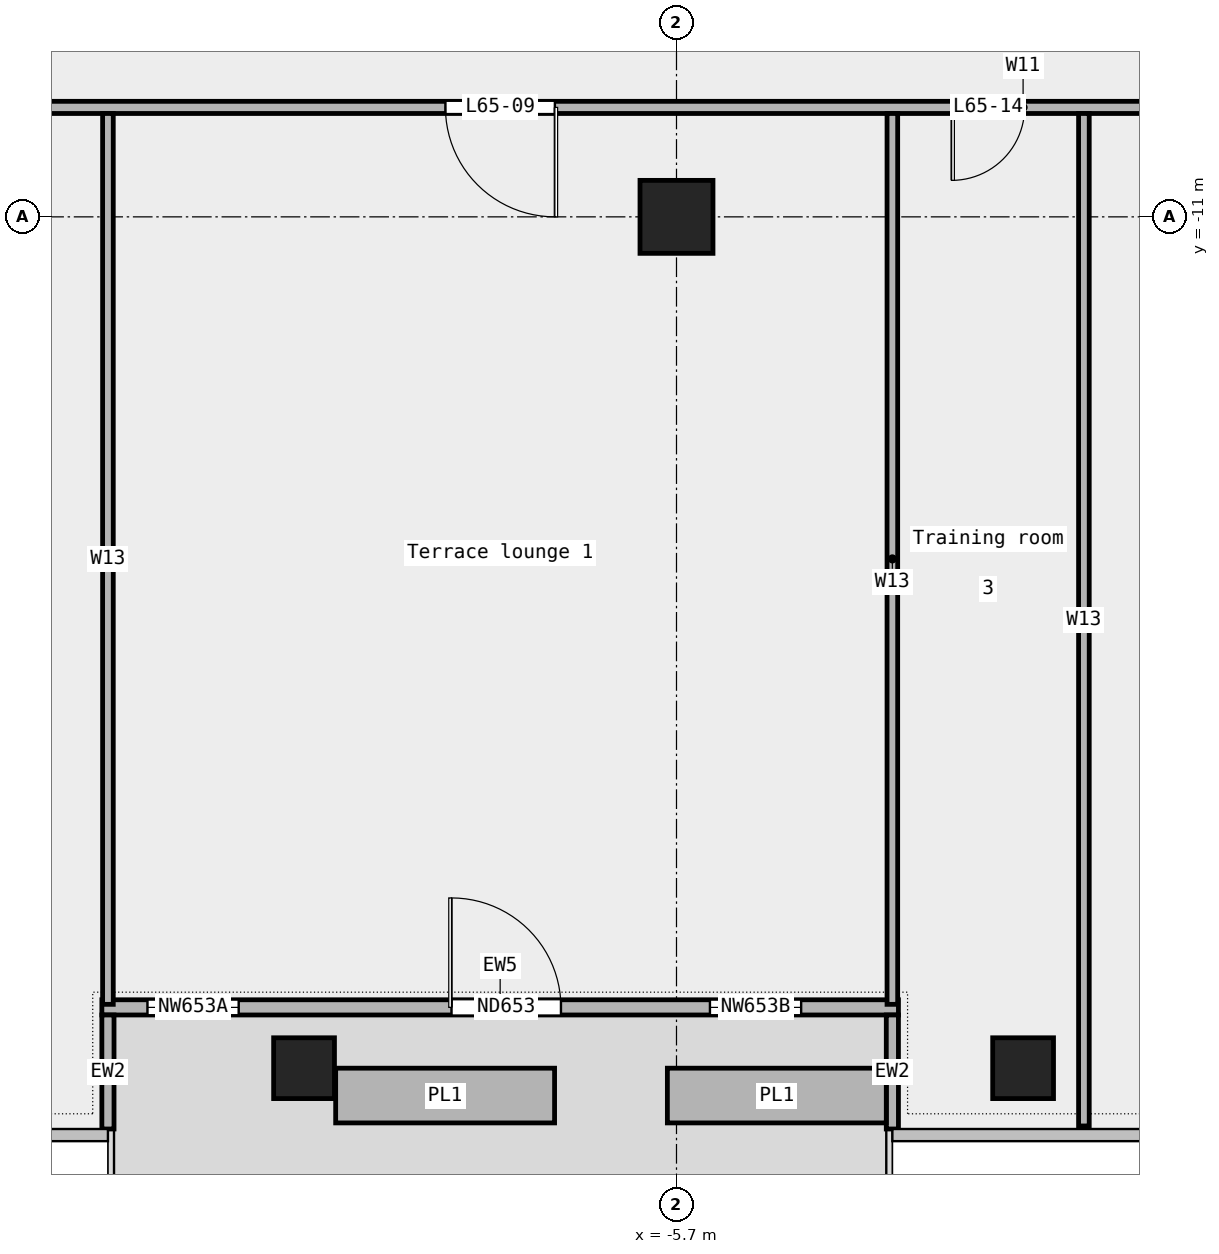
"""IFC4 building model, lengths in metres.
Left out: names, types, materials, properties, quantities, classifications, styles, units other than length and angle.
Written with IfcOpenShell. Run it as: python <this file> out.ifc"""

import sys

from ifc_helpers import new_model, si_unit, direction, frame, frame_2d, origin, origin_2d, place, context, subcontext, project, spatial, rectangle, extrude, element, fill, save


model = new_model("IFC4")
c1 = context("Model", 3, precision=1e-05, world=origin(), true_north=direction((0.0, 1.0)))
c2 = subcontext(c1, "Body", "Model", "MODEL_VIEW")
j1 = project(units=[si_unit("LENGTHUNIT", "METRE"), si_unit("PLANEANGLEUNIT", "RADIAN")], contexts=[c1])
p1 = place(None, origin())
s1 = spatial("IfcSite", under=j1, at=p1, CompositionType="ELEMENT")
p2 = place(p1, origin())
s2 = spatial("IfcBuilding", under=s1, at=p2, CompositionType="ELEMENT")
p3 = place(p2, frame((0.0, 0.0, 299.4)))
s3 = spatial("IfcBuildingStorey", under=s2, at=p3, CompositionType="ELEMENT", Elevation=299.4)
for number, where, z_axis, x_axis in (
    (1, (-11.825, -25.0, 0.0), (0.0, 0.0, 1.0), (1.0, 0.0, 0.0)),
    (2, (0.0, -25.0, 0.0), (0.0, 0.0, 1.0), (1.0, 0.0, 0.0)),
):
    element("IfcColumn", number, at=place(p3, frame(where, z_axis=z_axis, x_axis=x_axis)), inside=s3, PredefinedType="COLUMN", context=c2, shape_type="SweptSolid", body=[
        extrude(rectangle(XDim=1.0, YDim=1.0, at=origin_2d()), origin(), (0.0, 0.0, 1.0), 3.6),
    ])
p4 = place(p3, frame((-5.7, -11.0, 0.0), z_axis=(0.0, 0.0, 1.0), x_axis=(1.0, 0.0, 0.0)))
e3 = element("IfcColumn", 3, at=p4, inside=s3, PredefinedType="COLUMN", context=c2, shape_type="SweptSolid", body=[
    extrude(rectangle(XDim=1.2, YDim=1.2, at=origin_2d()), origin(), (0.0, 0.0, 1.0), 3.6),
])
p5 = place(p3, frame((-15.15, -24.0, 0.0), z_axis=(0.0, 0.0, 1.0), x_axis=(1.0, 0.0, 0.0)))
e4 = element("IfcWall", 4, at=p5, inside=s3, PredefinedType="STANDARD", context=c2, shape_type="SweptSolid", body=[
    extrude(rectangle(XDim=13.1, YDim=0.25, at=frame_2d((6.55, 0.0))), origin(), (0.0, 0.0, 1.0), 3.6),
])
p6 = place(p5, frame((0.75, 0.0, 0.45)))
e5 = element("IfcOpeningElement", 5, at=p6, cuts=e4, PredefinedType="OPENING", context=c2, shape_type="SweptSolid", body=[
    extrude(rectangle(XDim=1.5, YDim=2.4, at=frame_2d((0.75, 1.2))), frame((0.0, 0.137, 0.0), z_axis=(0.0, -1.0, 0.0), x_axis=(1.0, 0.0, 0.0)), (0.0, 0.0, 1.0), 0.274),
])
p7 = place(p5, frame((5.75, 0.0, 0.0)))
e6 = element("IfcOpeningElement", 6, at=p7, cuts=e4, PredefinedType="OPENING", context=c2, shape_type="SweptSolid", body=[
    extrude(rectangle(XDim=1.8, YDim=2.4, at=frame_2d((0.9, 1.2))), frame((0.0, 0.137, 0.0), z_axis=(0.0, -1.0, 0.0), x_axis=(1.0, 0.0, 0.0)), (0.0, 0.0, 1.0), 0.274),
])
p8 = place(p5, frame((10.0, 0.0, 0.45)))
e7 = element("IfcOpeningElement", 7, at=p8, cuts=e4, PredefinedType="OPENING", context=c2, shape_type="SweptSolid", body=[
    extrude(rectangle(XDim=1.5, YDim=2.4, at=frame_2d((0.75, 1.2))), frame((0.0, 0.137, 0.0), z_axis=(0.0, -1.0, 0.0), x_axis=(1.0, 0.0, 0.0)), (0.0, 0.0, 1.0), 0.274),
])
for number, where, z_axis, x_axis in (
    (8, (-15.05, -26.0, 0.0), (0.0, 0.0, 1.0), (0.0, 1.0, 0.0)),
    (9, (-2.15, -26.0, 0.0), (0.0, 0.0, 1.0), (0.0, 1.0, 0.0)),
):
    element("IfcWall", number, at=place(p3, frame(where, z_axis=z_axis, x_axis=x_axis)), inside=s3, PredefinedType="STANDARD", context=c2, shape_type="SweptSolid", body=[
        extrude(rectangle(XDim=1.875, YDim=0.2, at=frame_2d((0.938, 0.0))), origin(), (0.0, 0.0, 1.0), 3.6),
    ])
for number, where, z_axis, x_axis in (
    (10, (-11.305, -25.45, 0.0), (0.0, 0.0, 1.0), (1.0, 0.0, 0.0)),
    (11, (-5.85, -25.45, 0.0), (0.0, 0.0, 1.0), (1.0, 0.0, 0.0)),
):
    element("IfcWall", number, at=place(p3, frame(where, z_axis=z_axis, x_axis=x_axis)), inside=s3, PredefinedType="STANDARD", context=c2, shape_type="SweptSolid", body=[
        extrude(rectangle(XDim=3.6, YDim=0.9, at=frame_2d((1.8, 0.0))), origin(), (0.0, 0.0, 1.0), 0.7),
    ])
p9 = place(p3, frame((-29.6, -9.2, 0.0), z_axis=(0.0, 0.0, 1.0), x_axis=(1.0, 0.0, 0.0)))
e12 = element("IfcWall", 12, at=p9, inside=s3, PredefinedType="PARTITIONING", context=c2, shape_type="SweptSolid", body=[
    extrude(rectangle(XDim=59.2, YDim=0.2, at=frame_2d((29.6, 0.0))), origin(), (0.0, 0.0, 1.0), 3.6),
])
p10 = place(p9, frame((48.905, 0.0, 0.0)))
e13 = element("IfcOpeningElement", 13, at=p10, cuts=e12, PredefinedType="OPENING", context=c2, shape_type="SweptSolid", body=[
    extrude(rectangle(XDim=1.8, YDim=2.1, at=frame_2d((0.9, 1.05))), frame((0.0, 0.112, 0.0), z_axis=(0.0, -1.0, 0.0), x_axis=(1.0, 0.0, 0.0)), (0.0, 0.0, 1.0), 0.224),
])
p11 = place(p9, frame((36.205, 0.0, 0.0)))
e14 = element("IfcOpeningElement", 14, at=p11, cuts=e12, PredefinedType="OPENING", context=c2, shape_type="SweptSolid", body=[
    extrude(rectangle(XDim=1.8, YDim=2.1, at=frame_2d((0.9, 1.05))), frame((0.0, 0.112, 0.0), z_axis=(0.0, -1.0, 0.0), x_axis=(1.0, 0.0, 0.0)), (0.0, 0.0, 1.0), 0.224),
])
p12 = place(p9, frame((20.1, 0.0, 0.0)))
e15 = element("IfcOpeningElement", 15, at=p12, cuts=e12, PredefinedType="OPENING", context=c2, shape_type="SweptSolid", body=[
    extrude(rectangle(XDim=1.8, YDim=2.1, at=frame_2d((0.9, 1.05))), frame((0.0, 0.112, 0.0), z_axis=(0.0, -1.0, 0.0), x_axis=(1.0, 0.0, 0.0)), (0.0, 0.0, 1.0), 0.224),
])
p13 = place(p9, frame((6.475, 0.0, 0.0)))
e16 = element("IfcOpeningElement", 16, at=p13, cuts=e12, PredefinedType="OPENING", context=c2, shape_type="SweptSolid", body=[
    extrude(rectangle(XDim=1.8, YDim=2.1, at=frame_2d((0.9, 1.05))), frame((0.0, 0.112, 0.0), z_axis=(0.0, -1.0, 0.0), x_axis=(1.0, 0.0, 0.0)), (0.0, 0.0, 1.0), 0.224),
])
p14 = place(p9, frame((28.425, 0.0, 0.0)))
e17 = element("IfcOpeningElement", 17, at=p14, cuts=e12, PredefinedType="OPENING", context=c2, shape_type="SweptSolid", body=[
    extrude(rectangle(XDim=1.2, YDim=2.1, at=frame_2d((0.6, 1.05))), frame((0.0, 0.112, 0.0), z_axis=(0.0, -1.0, 0.0), x_axis=(1.0, 0.0, 0.0)), (0.0, 0.0, 1.0), 0.224),
])
for number, where, z_axis, x_axis in (
    (18, (-15.05, -23.95, 0.0), (0.0, 0.0, 1.0), (0.0, 1.0, 0.0)),
    (19, (-2.15, -23.95, 0.0), (0.0, 0.0, 1.0), (0.0, 1.0, 0.0)),
):
    element("IfcWall", number, at=place(p3, frame(where, z_axis=z_axis, x_axis=x_axis)), inside=s3, PredefinedType="PARTITIONING", context=c2, shape_type="SweptSolid", body=[
        extrude(rectangle(XDim=14.65, YDim=0.175, at=frame_2d((7.325, 0.0))), origin(), (0.0, 0.0, 1.0), 3.6),
    ])
p15 = place(p3, frame((1.0, -25.95, 0.0), z_axis=(0.0, 0.0, 1.0), x_axis=(0.0, 1.0, 0.0)))
e20 = element("IfcWall", 20, at=p15, inside=s3, PredefinedType="PARTITIONING", context=c2, shape_type="SweptSolid", body=[
    extrude(rectangle(XDim=16.65, YDim=0.175, at=frame_2d((8.325, 0.0))), origin(), (0.0, 0.0, 1.0), 3.6),
])
p16 = place(p6, origin())
e21 = element("IfcWindow", 21, at=p16, inside=s3, PartitioningType="SINGLE_PANEL", PredefinedType="WINDOW", context=c2, shape_type="SweptSolid", body=[
    extrude(rectangle(XDim=1.5, YDim=2.4, at=frame_2d((0.75, 1.2))), frame((0.0, 0.03, 0.0), z_axis=(0.0, -1.0, 0.0), x_axis=(1.0, 0.0, 0.0)), (0.0, 0.0, 1.0), 0.06),
])
fill(e5, e21)
p17 = place(p7, origin())
e22 = element("IfcDoor", 22, at=p17, inside=s3, OperationType="DOUBLE_DOOR_SINGLE_SWING", PredefinedType="DOOR", context=c2, shape_type="SweptSolid", body=[
    extrude(rectangle(XDim=1.8, YDim=2.4, at=frame_2d((0.9, 1.2))), frame((0.0, 0.025, 0.0), z_axis=(0.0, -1.0, 0.0), x_axis=(1.0, 0.0, 0.0)), (0.0, 0.0, 1.0), 0.05),
])
fill(e6, e22)
p18 = place(p8, origin())
e23 = element("IfcWindow", 23, at=p18, inside=s3, PartitioningType="SINGLE_PANEL", PredefinedType="WINDOW", context=c2, shape_type="SweptSolid", body=[
    extrude(rectangle(XDim=1.5, YDim=2.4, at=frame_2d((0.75, 1.2))), frame((0.0, 0.03, 0.0), z_axis=(0.0, -1.0, 0.0), x_axis=(1.0, 0.0, 0.0)), (0.0, 0.0, 1.0), 0.06),
])
fill(e7, e23)
p19 = place(p12, origin())
e24 = element("IfcDoor", 24, at=p19, inside=s3, OperationType="DOUBLE_DOOR_SINGLE_SWING", PredefinedType="DOOR", context=c2, shape_type="SweptSolid", body=[
    extrude(rectangle(XDim=1.8, YDim=2.1, at=frame_2d((0.9, 1.05))), frame((0.0, 0.025, 0.0), z_axis=(0.0, -1.0, 0.0), x_axis=(1.0, 0.0, 0.0)), (0.0, 0.0, 1.0), 0.05),
])
fill(e15, e24)
p20 = place(p14, origin())
e25 = element("IfcDoor", 25, at=p20, inside=s3, OperationType="SINGLE_SWING_RIGHT", PredefinedType="DOOR", context=c2, shape_type="SweptSolid", body=[
    extrude(rectangle(XDim=1.2, YDim=2.1, at=frame_2d((0.6, 1.05))), frame((0.0, 0.025, 0.0), z_axis=(0.0, -1.0, 0.0), x_axis=(1.0, 0.0, 0.0)), (0.0, 0.0, 1.0), 0.05),
])
fill(e17, e25)
save(model, sys.argv[1])
